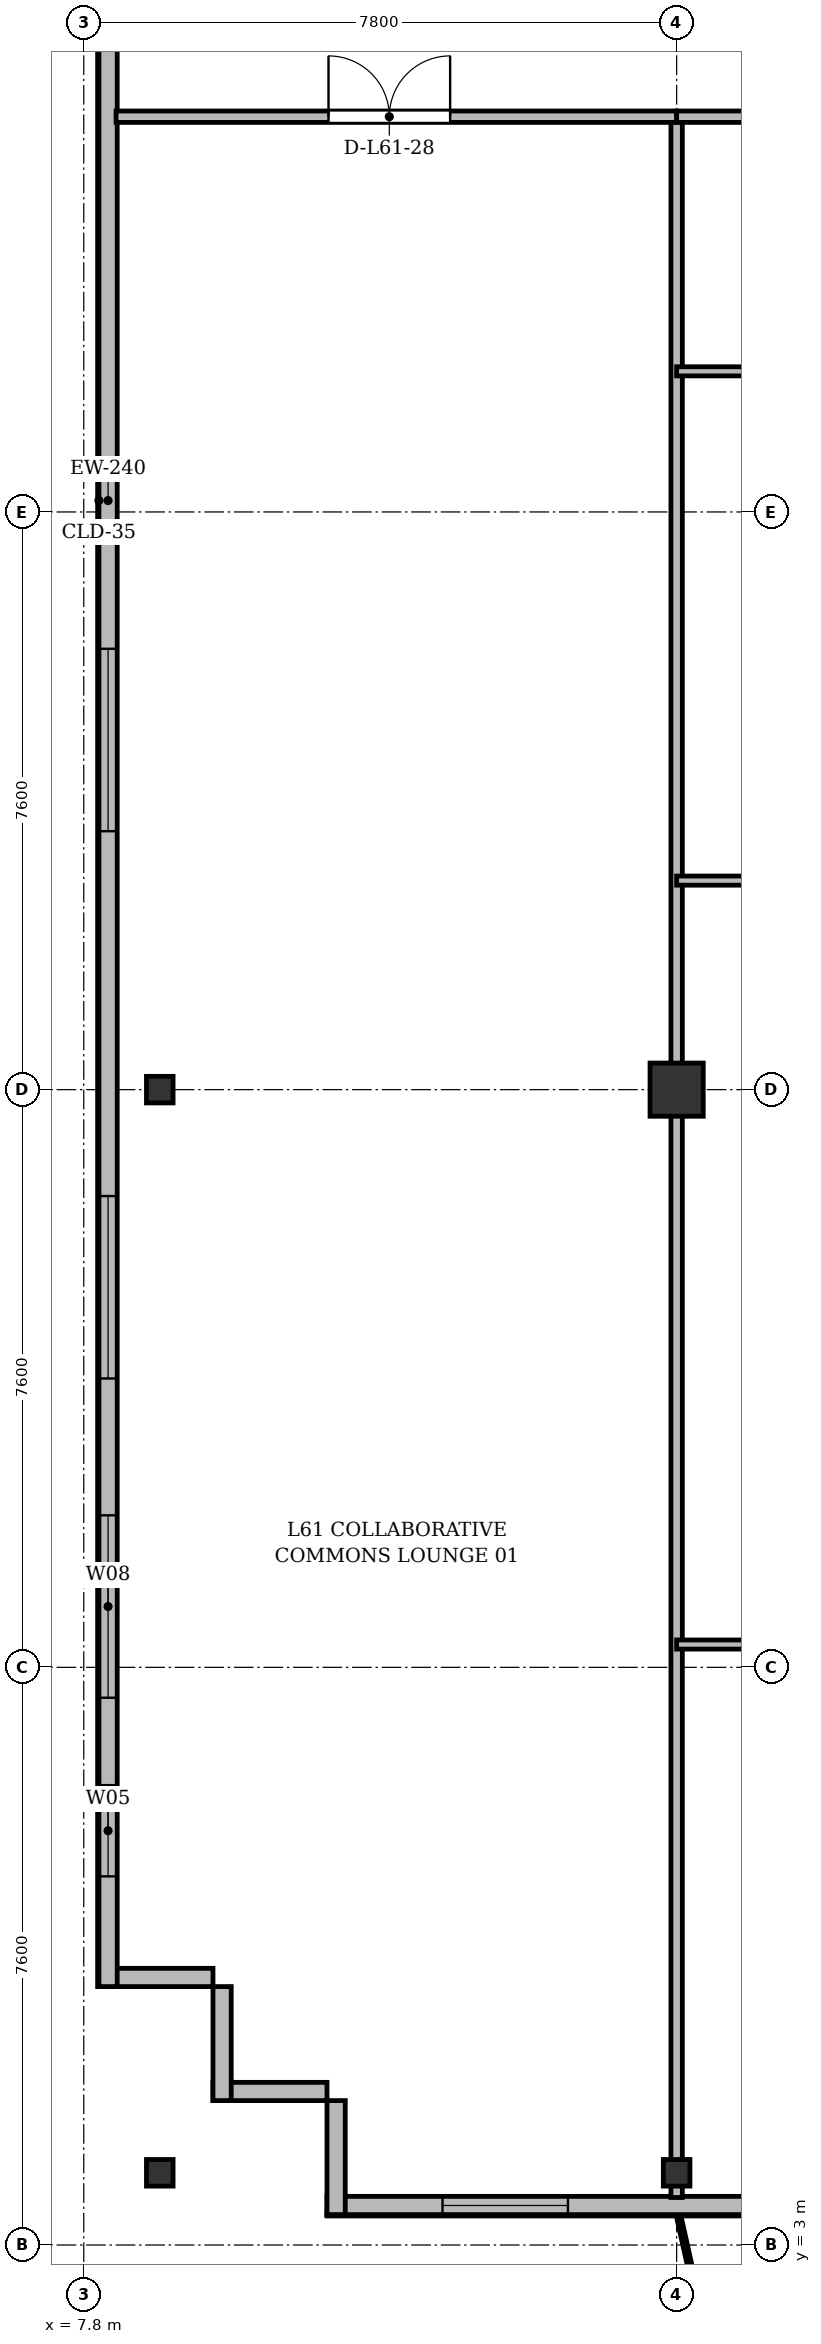
"""IFC4 building model, lengths in metres.
Left out: names, types, materials, properties, quantities, classifications, styles, units other than length and angle.
Written with IfcOpenShell. Run it as: python <this file> out.ifc"""

import sys

from ifc_helpers import new_model, si_unit, direction, frame, frame_2d, origin, origin_2d, place, context, subcontext, project, spatial, rectangle, i_section, extrude, source, transform, mapped, element, fill, save


model = new_model("IFC4")
c1 = context("Model", 3, precision=1e-05, world=origin(), true_north=direction((0.0, 1.0)))
c2 = subcontext(c1, "Body", "Model", "MODEL_VIEW")
j1 = project(units=[si_unit("LENGTHUNIT", "METRE"), si_unit("PLANEANGLEUNIT", "RADIAN")], contexts=[c1])
p1 = place(None, origin())
s1 = spatial("IfcSite", under=j1, at=p1, CompositionType="ELEMENT")
p2 = place(p1, origin())
s2 = spatial("IfcBuilding", under=s1, at=p2, CompositionType="ELEMENT")
p3 = place(p2, frame((0.0, 0.0, 233.7)))
s3 = spatial("IfcBuildingStorey", under=s2, at=p3, CompositionType="ELEMENT", Elevation=233.7)
m1 = source(origin(), c2, "Body", "SweptSolid", [
    extrude(i_section(OverallWidth=0.35, OverallDepth=0.35, WebThickness=0.018, FlangeThickness=0.028, at=origin_2d()), origin(), (0.0, 0.0, 1.0), 3.6),
])
for number, where, z_axis, x_axis in (
    (1, (8.8, 3.95, 0.0), (0.0, 0.0, 1.0), (1.0, 0.0, 0.0)),
    (2, (8.8, 18.2, 0.0), (0.0, 0.0, 1.0), (1.0, 0.0, 0.0)),
    (3, (15.6, 3.95, 0.0), (0.0, 0.0, 1.0), (1.0, 0.0, 0.0)),
):
    element("IfcColumn", number, at=place(p3, frame(where, z_axis=z_axis, x_axis=x_axis)), inside=s3, PredefinedType="COLUMN", context=c2, shape_type="MappedRepresentation", body=[
        mapped(m1, transform((0.0, 0.0, 0.0), x_axis=(1.0, 0.0, 0.0), y_axis=(0.0, 1.0, 0.0), z_axis=(0.0, 0.0, 1.0), scale=1.0)),
    ])
m2 = source(origin(), c2, "Body", "SweptSolid", [
    extrude(rectangle(XDim=0.7, YDim=0.7, at=origin_2d()), origin(), (0.0, 0.0, 1.0), 3.6),
])
p4 = place(p3, frame((15.6, 18.2, 0.0), z_axis=(0.0, 0.0, 1.0), x_axis=(1.0, 0.0, 0.0)))
e4 = element("IfcColumn", 4, at=p4, inside=s3, PredefinedType="COLUMN", context=c2, shape_type="MappedRepresentation", body=[
    mapped(m2, transform((0.0, 0.0, 0.0), x_axis=(1.0, 0.0, 0.0), y_axis=(0.0, 1.0, 0.0), z_axis=(0.0, 0.0, 1.0), scale=1.0)),
])
for number, where, z_axis, x_axis in (
    (5, (11.0, 5.02, 0.0), (0.0, 0.0, 1.0), (-1.0, 0.0, 0.0)),
    (6, (9.62, 4.9, 0.0), (0.0, 0.0, 1.0), (0.0, 1.0, 0.0)),
):
    element("IfcWall", number, at=place(p3, frame(where, z_axis=z_axis, x_axis=x_axis)), inside=s3, PredefinedType="SOLIDWALL", context=c2, shape_type="SweptSolid", body=[
        extrude(rectangle(XDim=1.5, YDim=0.24, at=frame_2d((0.75, 0.0))), origin(), (0.0, 0.0, 1.0), 3.36),
    ])
p5 = place(p3, frame((9.5, 6.52, 0.0), z_axis=(0.0, 0.0, 1.0), x_axis=(-1.0, 0.0, 0.0)))
e7 = element("IfcWall", 7, at=p5, inside=s3, PredefinedType="SOLIDWALL", context=c2, shape_type="SweptSolid", body=[
    extrude(rectangle(XDim=1.5, YDim=0.24, at=frame_2d((0.75, 0.0))), origin(), (0.0, 0.0, 1.0), 2.86),
])
p6 = place(p3, frame((8.12, 6.4, 0.0), z_axis=(0.0, 0.0, 1.0), x_axis=(0.0, 1.0, 0.0)))
e8 = element("IfcWall", 8, at=p6, inside=s3, PredefinedType="SOLIDWALL", context=c2, shape_type="SweptSolid", body=[
    extrude(rectangle(XDim=39.1, YDim=0.24, at=frame_2d((19.55, 0.0))), origin(), (0.0, 0.0, 1.0), 3.36),
])
p7 = place(p6, frame((1.45, 0.0, 0.92)))
e9 = element("IfcOpeningElement", 9, at=p7, cuts=e8, PredefinedType="OPENING", context=c2, shape_type="SweptSolid", body=[
    extrude(rectangle(XDim=1.2, YDim=1.65, at=frame_2d((0.6, 0.825))), frame((0.0, 0.13, 0.0), z_axis=(0.0, -1.0, 0.0), x_axis=(1.0, 0.0, 0.0)), (0.0, 0.0, 1.0), 0.26),
])
p8 = place(p6, frame((3.8, 0.0, 0.92)))
e10 = element("IfcOpeningElement", 10, at=p8, cuts=e8, PredefinedType="OPENING", context=c2, shape_type="SweptSolid", body=[
    extrude(rectangle(XDim=2.4, YDim=2.1, at=frame_2d((1.2, 1.05))), frame((0.0, 0.13, 0.0), z_axis=(0.0, -1.0, 0.0), x_axis=(1.0, 0.0, 0.0)), (0.0, 0.0, 1.0), 0.26),
])
p9 = place(p6, frame((8.0, 0.0, 0.92)))
e11 = element("IfcOpeningElement", 11, at=p9, cuts=e8, PredefinedType="OPENING", context=c2, shape_type="SweptSolid", body=[
    extrude(rectangle(XDim=2.4, YDim=2.1, at=frame_2d((1.2, 1.05))), frame((0.0, 0.13, 0.0), z_axis=(0.0, -1.0, 0.0), x_axis=(1.0, 0.0, 0.0)), (0.0, 0.0, 1.0), 0.26),
])
p10 = place(p6, frame((15.2, 0.0, 0.92)))
e12 = element("IfcOpeningElement", 12, at=p10, cuts=e8, PredefinedType="OPENING", context=c2, shape_type="SweptSolid", body=[
    extrude(rectangle(XDim=2.4, YDim=2.1, at=frame_2d((1.2, 1.05))), frame((0.0, 0.13, 0.0), z_axis=(0.0, -1.0, 0.0), x_axis=(1.0, 0.0, 0.0)), (0.0, 0.0, 1.0), 0.26),
])
p11 = place(p6, frame((29.2, 0.0, 0.92)))
e13 = element("IfcOpeningElement", 13, at=p11, cuts=e8, PredefinedType="OPENING", context=c2, shape_type="SweptSolid", body=[
    extrude(rectangle(XDim=2.4, YDim=2.1, at=frame_2d((1.2, 1.05))), frame((0.0, 0.13, 0.0), z_axis=(0.0, -1.0, 0.0), x_axis=(1.0, 0.0, 0.0)), (0.0, 0.0, 1.0), 0.26),
])
p12 = place(p6, frame((36.75, 0.0, 0.92)))
e14 = element("IfcOpeningElement", 14, at=p12, cuts=e8, PredefinedType="OPENING", context=c2, shape_type="SweptSolid", body=[
    extrude(rectangle(XDim=1.2, YDim=1.65, at=frame_2d((0.6, 0.825))), frame((0.0, 0.13, 0.0), z_axis=(0.0, -1.0, 0.0), x_axis=(1.0, 0.0, 0.0)), (0.0, 0.0, 1.0), 0.26),
])
p13 = place(p3, frame((44.8, 3.52, 0.0), z_axis=(0.0, 0.0, 1.0), x_axis=(-1.0, 0.0, 0.0)))
e15 = element("IfcWall", 15, at=p13, inside=s3, PredefinedType="SOLIDWALL", context=c2, shape_type="SweptSolid", body=[
    extrude(rectangle(XDim=33.8, YDim=0.24, at=frame_2d((16.9, 0.0))), origin(), (0.0, 0.0, 1.0), 3.36),
])
p14 = place(p13, frame((2.55, 0.0, 0.9)))
e16 = element("IfcOpeningElement", 16, at=p14, cuts=e15, PredefinedType="OPENING", context=c2, shape_type="SweptSolid", body=[
    extrude(rectangle(XDim=1.5, YDim=1.75, at=frame_2d((0.75, 0.875))), frame((0.0, 0.13, 0.0), z_axis=(0.0, -1.0, 0.0), x_axis=(1.0, 0.0, 0.0)), (0.0, 0.0, 1.0), 0.26),
])
p15 = place(p13, frame((6.034, 0.0, 0.9)))
e17 = element("IfcOpeningElement", 17, at=p15, cuts=e15, PredefinedType="OPENING", context=c2, shape_type="SweptSolid", body=[
    extrude(rectangle(XDim=2.0, YDim=1.95, at=frame_2d((1.0, 0.975))), frame((0.0, 0.13, 0.0), z_axis=(0.0, -1.0, 0.0), x_axis=(1.0, 0.0, 0.0)), (0.0, 0.0, 1.0), 0.26),
])
p16 = place(p13, frame((9.075, 0.0, 0.9)))
e18 = element("IfcOpeningElement", 18, at=p16, cuts=e15, PredefinedType="OPENING", context=c2, shape_type="SweptSolid", body=[
    extrude(rectangle(XDim=1.65, YDim=1.85, at=frame_2d((0.825, 0.925))), frame((0.0, 0.13, 0.0), z_axis=(0.0, -1.0, 0.0), x_axis=(1.0, 0.0, 0.0)), (0.0, 0.0, 1.0), 0.26),
])
p17 = place(p13, frame((11.867, 0.0, 0.9)))
e19 = element("IfcOpeningElement", 19, at=p17, cuts=e15, PredefinedType="OPENING", context=c2, shape_type="SweptSolid", body=[
    extrude(rectangle(XDim=1.8, YDim=1.8, at=frame_2d((0.9, 0.9))), frame((0.0, 0.13, 0.0), z_axis=(0.0, -1.0, 0.0), x_axis=(1.0, 0.0, 0.0)), (0.0, 0.0, 1.0), 0.26),
])
p18 = place(p13, frame((17.291, 0.0, 0.0)))
e20 = element("IfcOpeningElement", 20, at=p18, cuts=e15, PredefinedType="OPENING", context=c2, shape_type="SweptSolid", body=[
    extrude(rectangle(XDim=1.2, YDim=2.2, at=frame_2d((0.6, 1.1))), frame((0.0, 0.13, 0.0), z_axis=(0.0, -1.0, 0.0), x_axis=(1.0, 0.0, 0.0)), (0.0, 0.0, 1.0), 0.26),
])
p19 = place(p13, frame((22.6, 0.0, 0.9)))
e21 = element("IfcOpeningElement", 21, at=p19, cuts=e15, PredefinedType="OPENING", context=c2, shape_type="SweptSolid", body=[
    extrude(rectangle(XDim=1.5, YDim=1.75, at=frame_2d((0.75, 0.875))), frame((0.0, 0.13, 0.0), z_axis=(0.0, -1.0, 0.0), x_axis=(1.0, 0.0, 0.0)), (0.0, 0.0, 1.0), 0.26),
])
p20 = place(p13, frame((26.25, 0.0, 0.9)))
e22 = element("IfcOpeningElement", 22, at=p20, cuts=e15, PredefinedType="OPENING", context=c2, shape_type="SweptSolid", body=[
    extrude(rectangle(XDim=2.0, YDim=1.95, at=frame_2d((1.0, 0.975))), frame((0.0, 0.13, 0.0), z_axis=(0.0, -1.0, 0.0), x_axis=(1.0, 0.0, 0.0)), (0.0, 0.0, 1.0), 0.26),
])
p21 = place(p13, frame((30.63, 0.0, 0.9)))
e23 = element("IfcOpeningElement", 23, at=p21, cuts=e15, PredefinedType="OPENING", context=c2, shape_type="SweptSolid", body=[
    extrude(rectangle(XDim=1.65, YDim=1.85, at=frame_2d((0.825, 0.925))), frame((0.0, 0.13, 0.0), z_axis=(0.0, -1.0, 0.0), x_axis=(1.0, 0.0, 0.0)), (0.0, 0.0, 1.0), 0.26),
])
p22 = place(p3, frame((11.12, 3.4, 0.0), z_axis=(0.0, 0.0, 1.0), x_axis=(0.0, 1.0, 0.0)))
e24 = element("IfcWall", 24, at=p22, inside=s3, PredefinedType="SOLIDWALL", context=c2, shape_type="SweptSolid", body=[
    extrude(rectangle(XDim=1.5, YDim=0.24, at=frame_2d((0.75, 0.0))), origin(), (0.0, 0.0, 1.0), 2.91),
])
p23 = place(p3, frame((15.6, 3.625, 0.0), z_axis=(0.0, 0.0, 1.0), x_axis=(0.0, 1.0, 0.0)))
e25 = element("IfcWall", 25, at=p23, inside=s3, PredefinedType="PARTITIONING", context=c2, shape_type="SweptSolid", body=[
    extrude(rectangle(XDim=27.375, YDim=0.15, at=frame_2d((13.688, 0.0))), origin(), (0.0, 0.0, 1.0), 2.86),
])
p24 = place(p3, frame((8.225, 31.0, 0.0), z_axis=(0.0, 0.0, 1.0), x_axis=(1.0, 0.0, 0.0)))
e26 = element("IfcWall", 26, at=p24, inside=s3, PredefinedType="PARTITIONING", context=c2, shape_type="SweptSolid", body=[
    extrude(rectangle(XDim=7.375, YDim=0.15, at=frame_2d((3.688, 0.0))), origin(), (0.0, 0.0, 1.0), 2.86),
])
p25 = place(p24, frame((2.795, 0.0, 0.0)))
e27 = element("IfcOpeningElement", 27, at=p25, cuts=e26, PredefinedType="OPENING", context=c2, shape_type="SweptSolid", body=[
    extrude(rectangle(XDim=1.6, YDim=2.2, at=frame_2d((0.8, 1.1))), frame((0.0, 0.085, 0.0), z_axis=(0.0, -1.0, 0.0), x_axis=(1.0, 0.0, 0.0)), (0.0, 0.0, 1.0), 0.17),
])
p26 = place(p3, frame((15.6, 20.95, 0.0), z_axis=(0.0, 0.0, 1.0), x_axis=(1.0, 0.0, 0.0)))
e28 = element("IfcWall", 28, at=p26, inside=s3, PredefinedType="PARTITIONING", context=c2, shape_type="SweptSolid", body=[
    extrude(rectangle(XDim=7.8, YDim=0.12, at=frame_2d((3.9, 0.0))), origin(), (0.0, 0.0, 1.0), 2.86),
])
p27 = place(p26, frame((3.333, 0.0, 0.0)))
e29 = element("IfcOpeningElement", 29, at=p27, cuts=e28, PredefinedType="OPENING", context=c2, shape_type="SweptSolid", body=[
    extrude(rectangle(XDim=0.95, YDim=2.15, at=frame_2d((0.475, 1.075))), frame((0.0, 0.07, 0.0), z_axis=(0.0, -1.0, 0.0), x_axis=(1.0, 0.0, 0.0)), (0.0, 0.0, 1.0), 0.14),
])
p28 = place(p3, frame((15.6, 27.65, 0.0), z_axis=(0.0, 0.0, 1.0), x_axis=(1.0, 0.0, 0.0)))
e30 = element("IfcWall", 30, at=p28, inside=s3, PredefinedType="PARTITIONING", context=c2, shape_type="SweptSolid", body=[
    extrude(rectangle(XDim=2.4, YDim=0.12, at=frame_2d((1.2, 0.0))), origin(), (0.0, 0.0, 1.0), 2.86),
])
p29 = place(p3, frame((15.6, 31.0, 0.0), z_axis=(0.0, 0.0, 1.0), x_axis=(1.0, 0.0, 0.0)))
e31 = element("IfcWall", 31, at=p29, inside=s3, PredefinedType="PARTITIONING", context=c2, shape_type="SweptSolid", body=[
    extrude(rectangle(XDim=7.8, YDim=0.15, at=frame_2d((3.9, 0.0))), origin(), (0.0, 0.0, 1.0), 2.86),
])
p30 = place(p29, frame((5.172, 0.0, 0.0)))
e32 = element("IfcOpeningElement", 32, at=p30, cuts=e31, PredefinedType="OPENING", context=c2, shape_type="SweptSolid", body=[
    extrude(rectangle(XDim=0.95, YDim=2.15, at=frame_2d((0.475, 1.075))), frame((0.0, 0.085, 0.0), z_axis=(0.0, -1.0, 0.0), x_axis=(1.0, 0.0, 0.0)), (0.0, 0.0, 1.0), 0.17),
])
p31 = place(p3, frame((15.6, 10.9, 0.0), z_axis=(0.0, 0.0, 1.0), x_axis=(1.0, 0.0, 0.0)))
e33 = element("IfcWall", 33, at=p31, inside=s3, PredefinedType="PARTITIONING", context=c2, shape_type="SweptSolid", body=[
    extrude(rectangle(XDim=3.9, YDim=0.12, at=frame_2d((1.95, 0.0))), origin(), (0.0, 0.0, 1.0), 2.86),
])
p32 = place(p31, frame((1.475, 0.0, 0.0)))
e34 = element("IfcOpeningElement", 34, at=p32, cuts=e33, PredefinedType="OPENING", context=c2, shape_type="SweptSolid", body=[
    extrude(rectangle(XDim=0.95, YDim=2.15, at=frame_2d((0.475, 1.075))), frame((0.0, 0.07, 0.0), z_axis=(0.0, -1.0, 0.0), x_axis=(1.0, 0.0, 0.0)), (0.0, 0.0, 1.0), 0.14),
])
m3 = source(origin(), c2, "Body", "SweptSolid", [
    extrude(rectangle(XDim=1.2, YDim=1.65, at=frame_2d((0.6, 0.825))), frame((0.0, 0.03, 0.0), z_axis=(0.0, -1.0, 0.0), x_axis=(1.0, 0.0, 0.0)), (0.0, 0.0, 1.0), 0.06),
])
p33 = place(p7, origin())
e35 = element("IfcWindow", 35, at=p33, inside=s3, PartitioningType="SINGLE_PANEL", PredefinedType="WINDOW", context=c2, shape_type="MappedRepresentation", body=[
    mapped(m3, transform((0.0, 0.0, 0.0), x_axis=(1.0, 0.0, 0.0), y_axis=(0.0, 1.0, 0.0), z_axis=(0.0, 0.0, 1.0), scale=1.0)),
])
fill(e9, e35)
m4 = source(origin(), c2, "Body", "SweptSolid", [
    extrude(rectangle(XDim=2.4, YDim=2.1, at=frame_2d((1.2, 1.05))), frame((0.0, 0.03, 0.0), z_axis=(0.0, -1.0, 0.0), x_axis=(1.0, 0.0, 0.0)), (0.0, 0.0, 1.0), 0.06),
])
p34 = place(p8, origin())
e36 = element("IfcWindow", 36, at=p34, inside=s3, PartitioningType="SINGLE_PANEL", PredefinedType="WINDOW", context=c2, shape_type="MappedRepresentation", body=[
    mapped(m4, transform((0.0, 0.0, 0.0), x_axis=(1.0, 0.0, 0.0), y_axis=(0.0, 1.0, 0.0), z_axis=(0.0, 0.0, 1.0), scale=1.0)),
])
fill(e10, e36)
p35 = place(p9, origin())
e37 = element("IfcWindow", 37, at=p35, inside=s3, PartitioningType="SINGLE_PANEL", PredefinedType="WINDOW", context=c2, shape_type="MappedRepresentation", body=[
    mapped(m4, transform((0.0, 0.0, 0.0), x_axis=(1.0, 0.0, 0.0), y_axis=(0.0, 1.0, 0.0), z_axis=(0.0, 0.0, 1.0), scale=1.0)),
])
fill(e11, e37)
p36 = place(p10, origin())
e38 = element("IfcWindow", 38, at=p36, inside=s3, PartitioningType="SINGLE_PANEL", PredefinedType="WINDOW", context=c2, shape_type="MappedRepresentation", body=[
    mapped(m4, transform((0.0, 0.0, 0.0), x_axis=(1.0, 0.0, 0.0), y_axis=(0.0, 1.0, 0.0), z_axis=(0.0, 0.0, 1.0), scale=1.0)),
])
fill(e12, e38)
m5 = source(origin(), c2, "Body", "SweptSolid", [
    extrude(rectangle(XDim=1.65, YDim=1.85, at=frame_2d((0.825, 0.925))), frame((0.0, 0.03, 0.0), z_axis=(0.0, -1.0, 0.0), x_axis=(1.0, 0.0, 0.0)), (0.0, 0.0, 1.0), 0.06),
])
p37 = place(p21, origin())
e39 = element("IfcWindow", 39, at=p37, inside=s3, PartitioningType="SINGLE_PANEL", PredefinedType="WINDOW", context=c2, shape_type="MappedRepresentation", body=[
    mapped(m5, transform((0.0, 0.0, 0.0), x_axis=(1.0, 0.0, 0.0), y_axis=(0.0, 1.0, 0.0), z_axis=(0.0, 0.0, 1.0), scale=1.0)),
])
fill(e23, e39)
m6 = source(origin(), c2, "Body", "SweptSolid", [
    extrude(rectangle(XDim=1.6, YDim=2.2, at=frame_2d((0.8, 1.1))), frame((0.0, 0.025, 0.0), z_axis=(0.0, -1.0, 0.0), x_axis=(1.0, 0.0, 0.0)), (0.0, 0.0, 1.0), 0.05),
])
p38 = place(p25, origin())
e40 = element("IfcDoor", 40, at=p38, inside=s3, OperationType="DOUBLE_DOOR_SINGLE_SWING", PredefinedType="DOOR", context=c2, shape_type="MappedRepresentation", body=[
    mapped(m6, transform((0.0, 0.0, 0.0), x_axis=(1.0, 0.0, 0.0), y_axis=(0.0, 1.0, 0.0), z_axis=(0.0, 0.0, 1.0), scale=1.0)),
])
fill(e27, e40)
save(model, sys.argv[1])
